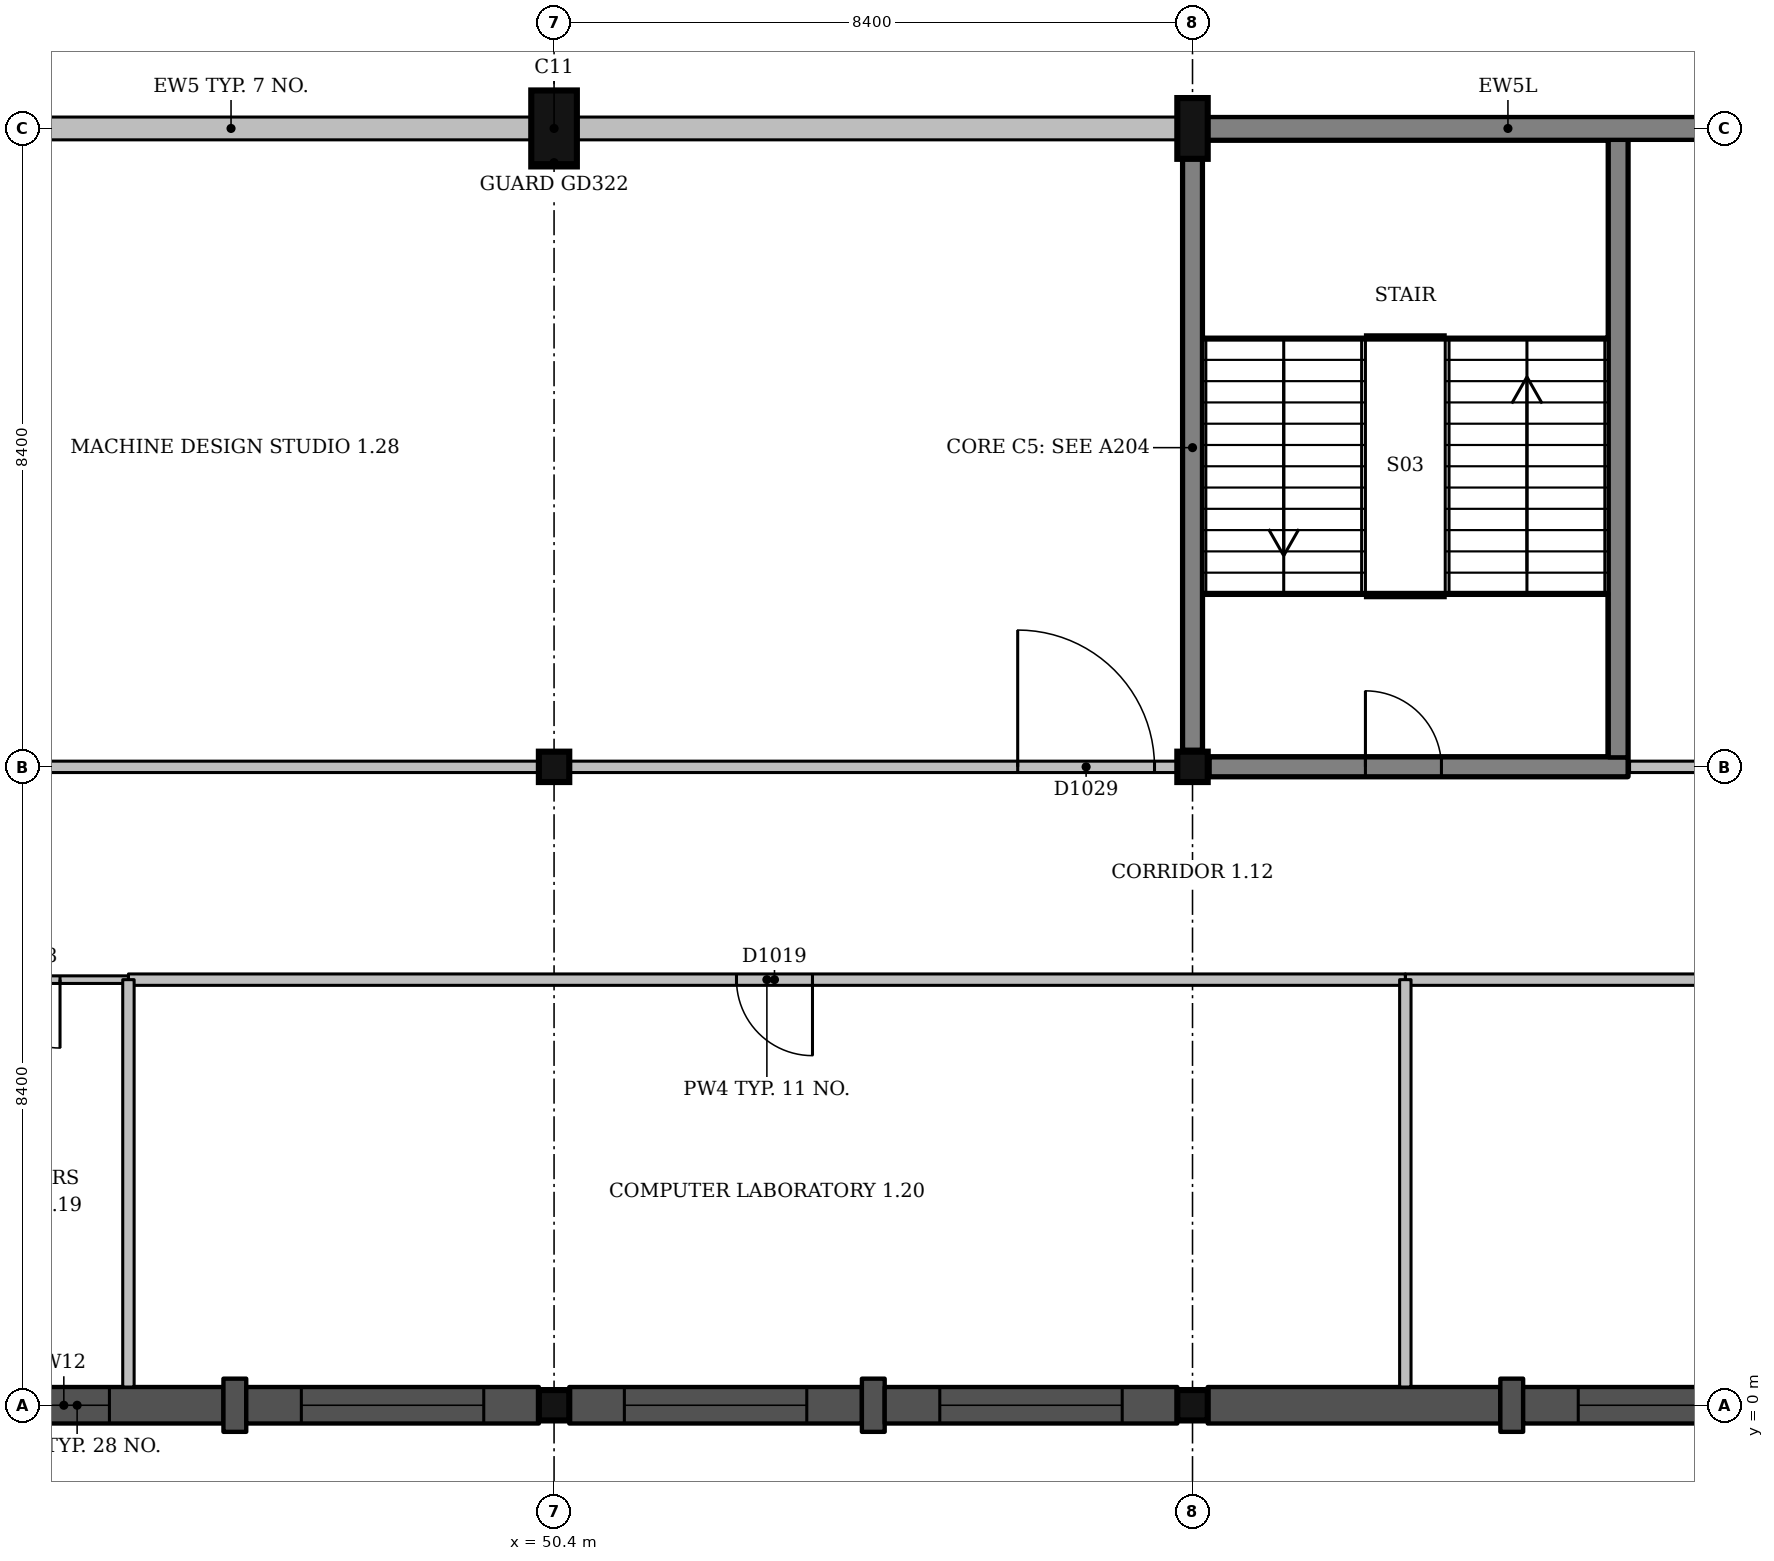
"""IFC4 building model, lengths in metres.
Left out: names, types, materials, properties, quantities, classifications, styles, units other than length and angle.
Written with IfcOpenShell. Run it as: python <this file> out.ifc"""

import sys

from ifc_helpers import new_model, si_unit, direction, frame, frame_2d, origin, origin_2d, place, context, subcontext, project, spatial, rectangle, extrude, element, fill, save


model = new_model("IFC4")
c1 = context("Model", 3, precision=1e-05, world=origin(), true_north=direction((0.0, 1.0)))
c2 = subcontext(c1, "Body", "Model", "MODEL_VIEW")
j1 = project(units=[si_unit("LENGTHUNIT", "METRE"), si_unit("PLANEANGLEUNIT", "RADIAN")], contexts=[c1])
p1 = place(None, origin())
s1 = spatial("IfcSite", under=j1, at=p1, CompositionType="ELEMENT")
p2 = place(p1, origin())
s2 = spatial("IfcBuilding", under=s1, at=p2, CompositionType="ELEMENT")
p3 = place(p2, frame((0.0, 0.0, 4.5)))
s3 = spatial("IfcBuildingStorey", under=s2, at=p3, CompositionType="ELEMENT", Elevation=4.5)
for number, where, z_axis, x_axis in (
    (1, (50.4, 0.0, 0.0), (0.0, 0.0, 1.0), (1.0, 0.0, 0.0)),
    (2, (50.4, 8.4, 0.0), (0.0, 0.0, 1.0), (1.0, 0.0, 0.0)),
):
    element("IfcColumn", number, at=place(p3, frame(where, z_axis=z_axis, x_axis=x_axis)), inside=s3, PredefinedType="COLUMN", context=c2, shape_type="SweptSolid", body=[
        extrude(rectangle(XDim=0.4, YDim=0.4, at=origin_2d()), origin(), (0.0, 0.0, 1.0), 4.5),
    ])
p4 = place(p3, frame((50.4, 16.8, 0.0), z_axis=(0.0, 0.0, 1.0), x_axis=(1.0, 0.0, 0.0)))
e3 = element("IfcColumn", 3, at=p4, inside=s3, PredefinedType="COLUMN", context=c2, shape_type="SweptSolid", body=[
    extrude(rectangle(XDim=0.6, YDim=1.0, at=origin_2d()), origin(), (0.0, 0.0, 1.0), 4.5),
])
for number, where, z_axis, x_axis in (
    (4, (58.8, 0.0, 0.0), (0.0, 0.0, 1.0), (1.0, 0.0, 0.0)),
    (5, (58.8, 8.4, 0.0), (0.0, 0.0, 1.0), (1.0, 0.0, 0.0)),
):
    element("IfcColumn", number, at=place(p3, frame(where, z_axis=z_axis, x_axis=x_axis)), inside=s3, PredefinedType="COLUMN", context=c2, shape_type="SweptSolid", body=[
        extrude(rectangle(XDim=0.4, YDim=0.4, at=origin_2d()), origin(), (0.0, 0.0, 1.0), 4.5),
    ])
p5 = place(p3, frame((58.8, 16.8, 0.0), z_axis=(0.0, 0.0, 1.0), x_axis=(1.0, 0.0, 0.0)))
e6 = element("IfcColumn", 6, at=p5, inside=s3, PredefinedType="COLUMN", context=c2, shape_type="SweptSolid", body=[
    extrude(rectangle(XDim=0.4, YDim=0.8, at=origin_2d()), origin(), (0.0, 0.0, 1.0), 4.5),
])
p6 = place(p3, frame((59.025, 8.4, 0.0), z_axis=(0.0, 0.0, 1.0), x_axis=(1.0, 0.0, 0.0)))
e7 = element("IfcWall", 7, at=p6, inside=s3, PredefinedType="SHEAR", context=c2, shape_type="SweptSolid", body=[
    extrude(rectangle(XDim=5.5, YDim=0.25, at=frame_2d((2.75, 0.0))), origin(), (0.0, 0.0, 1.0), 4.5),
])
p7 = place(p6, frame((2.05, 0.0, 0.0)))
e8 = element("IfcOpeningElement", 8, at=p7, cuts=e7, PredefinedType="OPENING", context=c2, shape_type="SweptSolid", body=[
    extrude(rectangle(XDim=1.0, YDim=2.1, at=frame_2d((0.5, 1.05))), frame((0.0, 0.135, 0.0), z_axis=(0.0, -1.0, 0.0), x_axis=(1.0, 0.0, 0.0)), (0.0, 0.0, 1.0), 0.27),
])
p8 = place(p3, frame((58.8, 8.625, 0.0), z_axis=(0.0, 0.0, 1.0), x_axis=(0.0, 1.0, 0.0)))
e9 = element("IfcWall", 9, at=p8, inside=s3, PredefinedType="SHEAR", context=c2, shape_type="SweptSolid", body=[
    extrude(rectangle(XDim=7.775, YDim=0.25, at=frame_2d((3.887, 0.0))), origin(), (0.0, 0.0, 1.0), 4.5),
])
p9 = place(p3, frame((64.4, 8.525, 0.0), z_axis=(0.0, 0.0, 1.0), x_axis=(0.0, 1.0, 0.0)))
e10 = element("IfcWall", 10, at=p9, inside=s3, PredefinedType="SHEAR", context=c2, shape_type="SweptSolid", body=[
    extrude(rectangle(XDim=8.15, YDim=0.25, at=frame_2d((4.075, 0.0))), origin(), (0.0, 0.0, 1.0), 4.5),
])
p10 = place(p3, frame((42.2, 0.0, 0.0), z_axis=(0.0, 0.0, 1.0), x_axis=(1.0, 0.0, 0.0)))
e11 = element("IfcWall", 11, at=p10, inside=s3, PredefinedType="SOLIDWALL", context=c2, shape_type="SweptSolid", body=[
    extrude(rectangle(XDim=3.85, YDim=0.48, at=frame_2d((1.925, 0.0))), origin(), (0.0, 0.0, 1.0), 3.45),
])
p11 = place(p10, frame((1.15, 0.0, 2.4)))
e12 = element("IfcOpeningElement", 12, at=p11, cuts=e11, PredefinedType="OPENING", context=c2, shape_type="SweptSolid", body=[
    extrude(rectangle(XDim=1.2, YDim=0.6, at=frame_2d((0.6, 0.3))), frame((0.0, 0.25, 0.0), z_axis=(0.0, -1.0, 0.0), x_axis=(1.0, 0.0, 0.0)), (0.0, 0.0, 1.0), 0.5),
])
p12 = place(p3, frame((46.05, 0.0, 0.0), z_axis=(0.0, 0.0, 1.0), x_axis=(1.0, 0.0, 0.0)))
e13 = element("IfcWall", 13, at=p12, inside=s3, PredefinedType="SOLIDWALL", context=c2, shape_type="SweptSolid", body=[
    extrude(rectangle(XDim=0.3, YDim=0.7, at=frame_2d((0.15, 0.0))), origin(), (0.0, 0.0, 1.0), 3.45),
])
p13 = place(p3, frame((46.35, 0.0, 0.0), z_axis=(0.0, 0.0, 1.0), x_axis=(1.0, 0.0, 0.0)))
e14 = element("IfcWall", 14, at=p13, inside=s3, PredefinedType="SOLIDWALL", context=c2, shape_type="SweptSolid", body=[
    extrude(rectangle(XDim=3.85, YDim=0.48, at=frame_2d((1.925, 0.0))), origin(), (0.0, 0.0, 1.0), 3.45),
])
p14 = place(p13, frame((0.725, 0.0, 2.4)))
e15 = element("IfcOpeningElement", 15, at=p14, cuts=e14, PredefinedType="OPENING", context=c2, shape_type="SweptSolid", body=[
    extrude(rectangle(XDim=2.4, YDim=0.6, at=frame_2d((1.2, 0.3))), frame((0.0, 0.25, 0.0), z_axis=(0.0, -1.0, 0.0), x_axis=(1.0, 0.0, 0.0)), (0.0, 0.0, 1.0), 0.5),
])
p15 = place(p3, frame((50.6, 0.0, 0.0), z_axis=(0.0, 0.0, 1.0), x_axis=(1.0, 0.0, 0.0)))
e16 = element("IfcWall", 16, at=p15, inside=s3, PredefinedType="SOLIDWALL", context=c2, shape_type="SweptSolid", body=[
    extrude(rectangle(XDim=3.85, YDim=0.48, at=frame_2d((1.925, 0.0))), origin(), (0.0, 0.0, 1.0), 3.45),
])
p16 = place(p15, frame((0.725, 0.0, 2.4)))
e17 = element("IfcOpeningElement", 17, at=p16, cuts=e16, PredefinedType="OPENING", context=c2, shape_type="SweptSolid", body=[
    extrude(rectangle(XDim=2.4, YDim=0.6, at=frame_2d((1.2, 0.3))), frame((0.0, 0.25, 0.0), z_axis=(0.0, -1.0, 0.0), x_axis=(1.0, 0.0, 0.0)), (0.0, 0.0, 1.0), 0.5),
])
p17 = place(p3, frame((54.45, 0.0, 0.0), z_axis=(0.0, 0.0, 1.0), x_axis=(1.0, 0.0, 0.0)))
e18 = element("IfcWall", 18, at=p17, inside=s3, PredefinedType="SOLIDWALL", context=c2, shape_type="SweptSolid", body=[
    extrude(rectangle(XDim=0.3, YDim=0.7, at=frame_2d((0.15, 0.0))), origin(), (0.0, 0.0, 1.0), 3.45),
])
p18 = place(p3, frame((54.75, 0.0, 0.0), z_axis=(0.0, 0.0, 1.0), x_axis=(1.0, 0.0, 0.0)))
e19 = element("IfcWall", 19, at=p18, inside=s3, PredefinedType="SOLIDWALL", context=c2, shape_type="SweptSolid", body=[
    extrude(rectangle(XDim=3.85, YDim=0.48, at=frame_2d((1.925, 0.0))), origin(), (0.0, 0.0, 1.0), 3.45),
])
p19 = place(p18, frame((0.725, 0.0, 2.4)))
e20 = element("IfcOpeningElement", 20, at=p19, cuts=e19, PredefinedType="OPENING", context=c2, shape_type="SweptSolid", body=[
    extrude(rectangle(XDim=2.4, YDim=0.6, at=frame_2d((1.2, 0.3))), frame((0.0, 0.25, 0.0), z_axis=(0.0, -1.0, 0.0), x_axis=(1.0, 0.0, 0.0)), (0.0, 0.0, 1.0), 0.5),
])
p20 = place(p3, frame((59.0, 0.0, 0.0), z_axis=(0.0, 0.0, 1.0), x_axis=(1.0, 0.0, 0.0)))
e21 = element("IfcWall", 21, at=p20, inside=s3, PredefinedType="SOLIDWALL", context=c2, shape_type="SweptSolid", body=[
    extrude(rectangle(XDim=3.85, YDim=0.48, at=frame_2d((1.925, 0.0))), origin(), (0.0, 0.0, 1.0), 3.45),
])
p21 = place(p3, frame((62.85, 0.0, 0.0), z_axis=(0.0, 0.0, 1.0), x_axis=(1.0, 0.0, 0.0)))
e22 = element("IfcWall", 22, at=p21, inside=s3, PredefinedType="SOLIDWALL", context=c2, shape_type="SweptSolid", body=[
    extrude(rectangle(XDim=0.3, YDim=0.7, at=frame_2d((0.15, 0.0))), origin(), (0.0, 0.0, 1.0), 3.45),
])
p22 = place(p3, frame((63.15, 0.0, 0.0), z_axis=(0.0, 0.0, 1.0), x_axis=(1.0, 0.0, 0.0)))
e23 = element("IfcWall", 23, at=p22, inside=s3, PredefinedType="SOLIDWALL", context=c2, shape_type="SweptSolid", body=[
    extrude(rectangle(XDim=3.85, YDim=0.48, at=frame_2d((1.925, 0.0))), origin(), (0.0, 0.0, 1.0), 3.45),
])
p23 = place(p22, frame((0.725, 0.0, 2.4)))
e24 = element("IfcOpeningElement", 24, at=p23, cuts=e23, PredefinedType="OPENING", context=c2, shape_type="SweptSolid", body=[
    extrude(rectangle(XDim=2.4, YDim=0.6, at=frame_2d((1.2, 0.3))), frame((0.0, 0.25, 0.0), z_axis=(0.0, -1.0, 0.0), x_axis=(1.0, 0.0, 0.0)), (0.0, 0.0, 1.0), 0.5),
])
p24 = place(p3, frame((66.9, 16.8, 0.0), z_axis=(0.0, 0.0, 1.0), x_axis=(-1.0, 0.0, 0.0)))
e25 = element("IfcWall", 25, at=p24, inside=s3, PredefinedType="SOLIDWALL", context=c2, shape_type="SweptSolid", body=[
    extrude(rectangle(XDim=7.9, YDim=0.3, at=frame_2d((3.95, 0.0))), origin(), (0.0, 0.0, 1.0), 3.45),
])
for number, where, z_axis, x_axis in (
    (26, (58.6, 16.8, 0.0), (0.0, 0.0, 1.0), (-1.0, 0.0, 0.0)),
    (27, (50.1, 16.8, 0.0), (0.0, 0.0, 1.0), (-1.0, 0.0, 0.0)),
):
    element("IfcWall", number, at=place(p3, frame(where, z_axis=z_axis, x_axis=x_axis)), inside=s3, PredefinedType="SOLIDWALL", context=c2, shape_type="SweptSolid", body=[
        extrude(rectangle(XDim=7.9, YDim=0.3, at=frame_2d((3.95, 0.0))), origin(), (0.0, 0.0, 1.0), 3.45),
    ])
p25 = place(p3, frame((61.6, 5.6, 0.0), z_axis=(0.0, 0.0, 1.0), x_axis=(1.0, 0.0, 0.0)))
e28 = element("IfcWall", 28, at=p25, inside=s3, PredefinedType="PARTITIONING", context=c2, shape_type="SweptSolid", body=[
    extrude(rectangle(XDim=30.0, YDim=0.15, at=frame_2d((15.0, 0.0))), origin(), (0.0, 0.0, 1.0), 3.5),
])
p26 = place(p25, frame((8.0, 0.0, 0.0)))
e29 = element("IfcOpeningElement", 29, at=p26, cuts=e28, PredefinedType="OPENING", context=c2, shape_type="SweptSolid", body=[
    extrude(rectangle(XDim=0.9, YDim=2.1, at=frame_2d((0.45, 1.05))), frame((0.0, 0.085, 0.0), z_axis=(0.0, -1.0, 0.0), x_axis=(1.0, 0.0, 0.0)), (0.0, 0.0, 1.0), 0.17),
])
p27 = place(p25, frame((20.6, 0.0, 0.0)))
e30 = element("IfcOpeningElement", 30, at=p27, cuts=e28, PredefinedType="OPENING", context=c2, shape_type="SweptSolid", body=[
    extrude(rectangle(XDim=0.9, YDim=2.1, at=frame_2d((0.45, 1.05))), frame((0.0, 0.085, 0.0), z_axis=(0.0, -1.0, 0.0), x_axis=(1.0, 0.0, 0.0)), (0.0, 0.0, 1.0), 0.17),
])
p28 = place(p25, frame((29.0, 0.0, 0.0)))
e31 = element("IfcOpeningElement", 31, at=p28, cuts=e28, PredefinedType="OPENING", context=c2, shape_type="SweptSolid", body=[
    extrude(rectangle(XDim=0.9, YDim=2.1, at=frame_2d((0.45, 1.05))), frame((0.0, 0.085, 0.0), z_axis=(0.0, -1.0, 0.0), x_axis=(1.0, 0.0, 0.0)), (0.0, 0.0, 1.0), 0.17),
])
p29 = place(p3, frame((44.8, 5.6, 0.0), z_axis=(0.0, 0.0, 1.0), x_axis=(1.0, 0.0, 0.0)))
e32 = element("IfcWall", 32, at=p29, inside=s3, PredefinedType="PARTITIONING", context=c2, shape_type="SweptSolid", body=[
    extrude(rectangle(XDim=16.8, YDim=0.15, at=frame_2d((8.4, 0.0))), origin(), (0.0, 0.0, 1.0), 3.5),
])
p30 = place(p29, frame((8.0, 0.0, 0.0)))
e33 = element("IfcOpeningElement", 33, at=p30, cuts=e32, PredefinedType="OPENING", context=c2, shape_type="SweptSolid", body=[
    extrude(rectangle(XDim=1.0, YDim=2.1, at=frame_2d((0.5, 1.05))), frame((0.0, 0.085, 0.0), z_axis=(0.0, -1.0, 0.0), x_axis=(1.0, 0.0, 0.0)), (0.0, 0.0, 1.0), 0.17),
])
p31 = place(p3, frame((33.6, 5.6, 0.0), z_axis=(0.0, 0.0, 1.0), x_axis=(1.0, 0.0, 0.0)))
e34 = element("IfcWall", 34, at=p31, inside=s3, PredefinedType="PARTITIONING", context=c2, shape_type="SweptSolid", body=[
    extrude(rectangle(XDim=11.2, YDim=0.1, at=frame_2d((5.6, 0.0))), origin(), (0.0, 0.0, 1.0), 3.5),
])
p32 = place(p31, frame((1.0, 0.0, 0.0)))
e35 = element("IfcOpeningElement", 35, at=p32, cuts=e34, PredefinedType="OPENING", context=c2, shape_type="SweptSolid", body=[
    extrude(rectangle(XDim=0.9, YDim=2.1, at=frame_2d((0.45, 1.05))), frame((0.0, 0.06, 0.0), z_axis=(0.0, -1.0, 0.0), x_axis=(1.0, 0.0, 0.0)), (0.0, 0.0, 1.0), 0.12),
])
p33 = place(p31, frame((3.8, 0.0, 0.0)))
e36 = element("IfcOpeningElement", 36, at=p33, cuts=e34, PredefinedType="OPENING", context=c2, shape_type="SweptSolid", body=[
    extrude(rectangle(XDim=0.9, YDim=2.1, at=frame_2d((0.45, 1.05))), frame((0.0, 0.06, 0.0), z_axis=(0.0, -1.0, 0.0), x_axis=(1.0, 0.0, 0.0)), (0.0, 0.0, 1.0), 0.12),
])
p34 = place(p31, frame((6.6, 0.0, 0.0)))
e37 = element("IfcOpeningElement", 37, at=p34, cuts=e34, PredefinedType="OPENING", context=c2, shape_type="SweptSolid", body=[
    extrude(rectangle(XDim=1.0, YDim=2.1, at=frame_2d((0.5, 1.05))), frame((0.0, 0.06, 0.0), z_axis=(0.0, -1.0, 0.0), x_axis=(1.0, 0.0, 0.0)), (0.0, 0.0, 1.0), 0.12),
])
p35 = place(p31, frame((9.4, 0.0, 0.0)))
e38 = element("IfcOpeningElement", 38, at=p35, cuts=e34, PredefinedType="OPENING", context=c2, shape_type="SweptSolid", body=[
    extrude(rectangle(XDim=0.9, YDim=2.1, at=frame_2d((0.45, 1.05))), frame((0.0, 0.06, 0.0), z_axis=(0.0, -1.0, 0.0), x_axis=(1.0, 0.0, 0.0)), (0.0, 0.0, 1.0), 0.12),
])
p36 = place(p3, frame((42.2, 8.4, 0.0), z_axis=(0.0, 0.0, 1.0), x_axis=(1.0, 0.0, 0.0)))
e39 = element("IfcWall", 39, at=p36, inside=s3, PredefinedType="PARTITIONING", context=c2, shape_type="SweptSolid", body=[
    extrude(rectangle(XDim=8.0, YDim=0.15, at=frame_2d((4.0, 0.0))), origin(), (0.0, 0.0, 1.0), 3.5),
])
p37 = place(p3, frame((50.6, 8.4, 0.0), z_axis=(0.0, 0.0, 1.0), x_axis=(1.0, 0.0, 0.0)))
e40 = element("IfcWall", 40, at=p37, inside=s3, PredefinedType="PARTITIONING", context=c2, shape_type="SweptSolid", body=[
    extrude(rectangle(XDim=8.0, YDim=0.15, at=frame_2d((4.0, 0.0))), origin(), (0.0, 0.0, 1.0), 3.5),
])
p38 = place(p37, frame((5.9, 0.0, 0.0)))
e41 = element("IfcOpeningElement", 41, at=p38, cuts=e40, PredefinedType="OPENING", context=c2, shape_type="SweptSolid", body=[
    extrude(rectangle(XDim=1.8, YDim=2.1, at=frame_2d((0.9, 1.05))), frame((0.0, 0.085, 0.0), z_axis=(0.0, -1.0, 0.0), x_axis=(1.0, 0.0, 0.0)), (0.0, 0.0, 1.0), 0.17),
])
p39 = place(p3, frame((64.55, 8.4, 0.0), z_axis=(0.0, 0.0, 1.0), x_axis=(1.0, 0.0, 0.0)))
e42 = element("IfcWall", 42, at=p39, inside=s3, PredefinedType="PARTITIONING", context=c2, shape_type="SweptSolid", body=[
    extrude(rectangle(XDim=2.45, YDim=0.15, at=frame_2d((1.225, 0.0))), origin(), (0.0, 0.0, 1.0), 3.6),
])
for number, where, z_axis, x_axis in (
    (43, (44.8, 0.24, 0.0), (0.0, 0.0, 1.0), (0.0, 1.0, 0.0)),
    (44, (61.6, 0.24, 0.0), (0.0, 0.0, 1.0), (0.0, 1.0, 0.0)),
):
    element("IfcWall", number, at=place(p3, frame(where, z_axis=z_axis, x_axis=x_axis)), inside=s3, PredefinedType="PARTITIONING", context=c2, shape_type="SweptSolid", body=[
        extrude(rectangle(XDim=5.36, YDim=0.15, at=frame_2d((2.68, 0.0))), origin(), (0.0, 0.0, 1.0), 4.15),
    ])
p40 = place(p11, origin())
e45 = element("IfcWindow", 45, at=p40, inside=s3, PartitioningType="SINGLE_PANEL", PredefinedType="WINDOW", context=c2, shape_type="SweptSolid", body=[
    extrude(rectangle(XDim=1.2, YDim=0.6, at=frame_2d((0.6, 0.3))), frame((0.0, 0.12, 0.0), z_axis=(0.0, -1.0, 0.0), x_axis=(1.0, 0.0, 0.0)), (0.0, 0.0, 1.0), 0.06),
])
fill(e12, e45)
p41 = place(p14, origin())
e46 = element("IfcWindow", 46, at=p41, inside=s3, PartitioningType="SINGLE_PANEL", PredefinedType="WINDOW", context=c2, shape_type="SweptSolid", body=[
    extrude(rectangle(XDim=2.4, YDim=0.6, at=frame_2d((1.2, 0.3))), frame((0.0, 0.12, 0.0), z_axis=(0.0, -1.0, 0.0), x_axis=(1.0, 0.0, 0.0)), (0.0, 0.0, 1.0), 0.06),
])
fill(e15, e46)
p42 = place(p16, origin())
e47 = element("IfcWindow", 47, at=p42, inside=s3, PartitioningType="SINGLE_PANEL", PredefinedType="WINDOW", context=c2, shape_type="SweptSolid", body=[
    extrude(rectangle(XDim=2.4, YDim=0.6, at=frame_2d((1.2, 0.3))), frame((0.0, 0.12, 0.0), z_axis=(0.0, -1.0, 0.0), x_axis=(1.0, 0.0, 0.0)), (0.0, 0.0, 1.0), 0.06),
])
fill(e17, e47)
p43 = place(p19, origin())
e48 = element("IfcWindow", 48, at=p43, inside=s3, PartitioningType="SINGLE_PANEL", PredefinedType="WINDOW", context=c2, shape_type="SweptSolid", body=[
    extrude(rectangle(XDim=2.4, YDim=0.6, at=frame_2d((1.2, 0.3))), frame((0.0, 0.12, 0.0), z_axis=(0.0, -1.0, 0.0), x_axis=(1.0, 0.0, 0.0)), (0.0, 0.0, 1.0), 0.06),
])
fill(e20, e48)
p44 = place(p23, origin())
e49 = element("IfcWindow", 49, at=p44, inside=s3, PartitioningType="SINGLE_PANEL", PredefinedType="WINDOW", context=c2, shape_type="SweptSolid", body=[
    extrude(rectangle(XDim=2.4, YDim=0.6, at=frame_2d((1.2, 0.3))), frame((0.0, 0.12, 0.0), z_axis=(0.0, -1.0, 0.0), x_axis=(1.0, 0.0, 0.0)), (0.0, 0.0, 1.0), 0.06),
])
fill(e24, e49)
p45 = place(p35, origin())
e50 = element("IfcDoor", 50, at=p45, inside=s3, OperationType="SINGLE_SWING_RIGHT", PredefinedType="DOOR", context=c2, shape_type="SweptSolid", body=[
    extrude(rectangle(XDim=0.9, YDim=2.1, at=frame_2d((0.45, 1.05))), frame((0.0, 0.025, 0.0), z_axis=(0.0, -1.0, 0.0), x_axis=(1.0, 0.0, 0.0)), (0.0, 0.0, 1.0), 0.05),
])
fill(e38, e50)
p46 = place(p30, origin())
e51 = element("IfcDoor", 51, at=p46, inside=s3, OperationType="SINGLE_SWING_RIGHT", PredefinedType="DOOR", context=c2, shape_type="SweptSolid", body=[
    extrude(rectangle(XDim=1.0, YDim=2.1, at=frame_2d((0.5, 1.05))), frame((0.0, 0.025, 0.0), z_axis=(0.0, -1.0, 0.0), x_axis=(1.0, 0.0, 0.0)), (0.0, 0.0, 1.0), 0.05),
])
fill(e33, e51)
p47 = place(p38, origin())
e52 = element("IfcDoor", 52, at=p47, inside=s3, OperationType="DOUBLE_DOOR_SINGLE_SWING", PredefinedType="DOOR", context=c2, shape_type="SweptSolid", body=[
    extrude(rectangle(XDim=1.8, YDim=2.1, at=frame_2d((0.9, 1.05))), frame((0.0, 0.025, 0.0), z_axis=(0.0, -1.0, 0.0), x_axis=(1.0, 0.0, 0.0)), (0.0, 0.0, 1.0), 0.05),
])
fill(e41, e52)
p48 = place(p7, origin())
e53 = element("IfcDoor", 53, at=p48, inside=s3, OperationType="SINGLE_SWING_LEFT", PredefinedType="DOOR", context=c2, shape_type="SweptSolid", body=[
    extrude(rectangle(XDim=1.0, YDim=2.1, at=frame_2d((0.5, 1.05))), frame((0.0, 0.025, 0.0), z_axis=(0.0, -1.0, 0.0), x_axis=(1.0, 0.0, 0.0)), (0.0, 0.0, 1.0), 0.05),
])
fill(e8, e53)
save(model, sys.argv[1])
